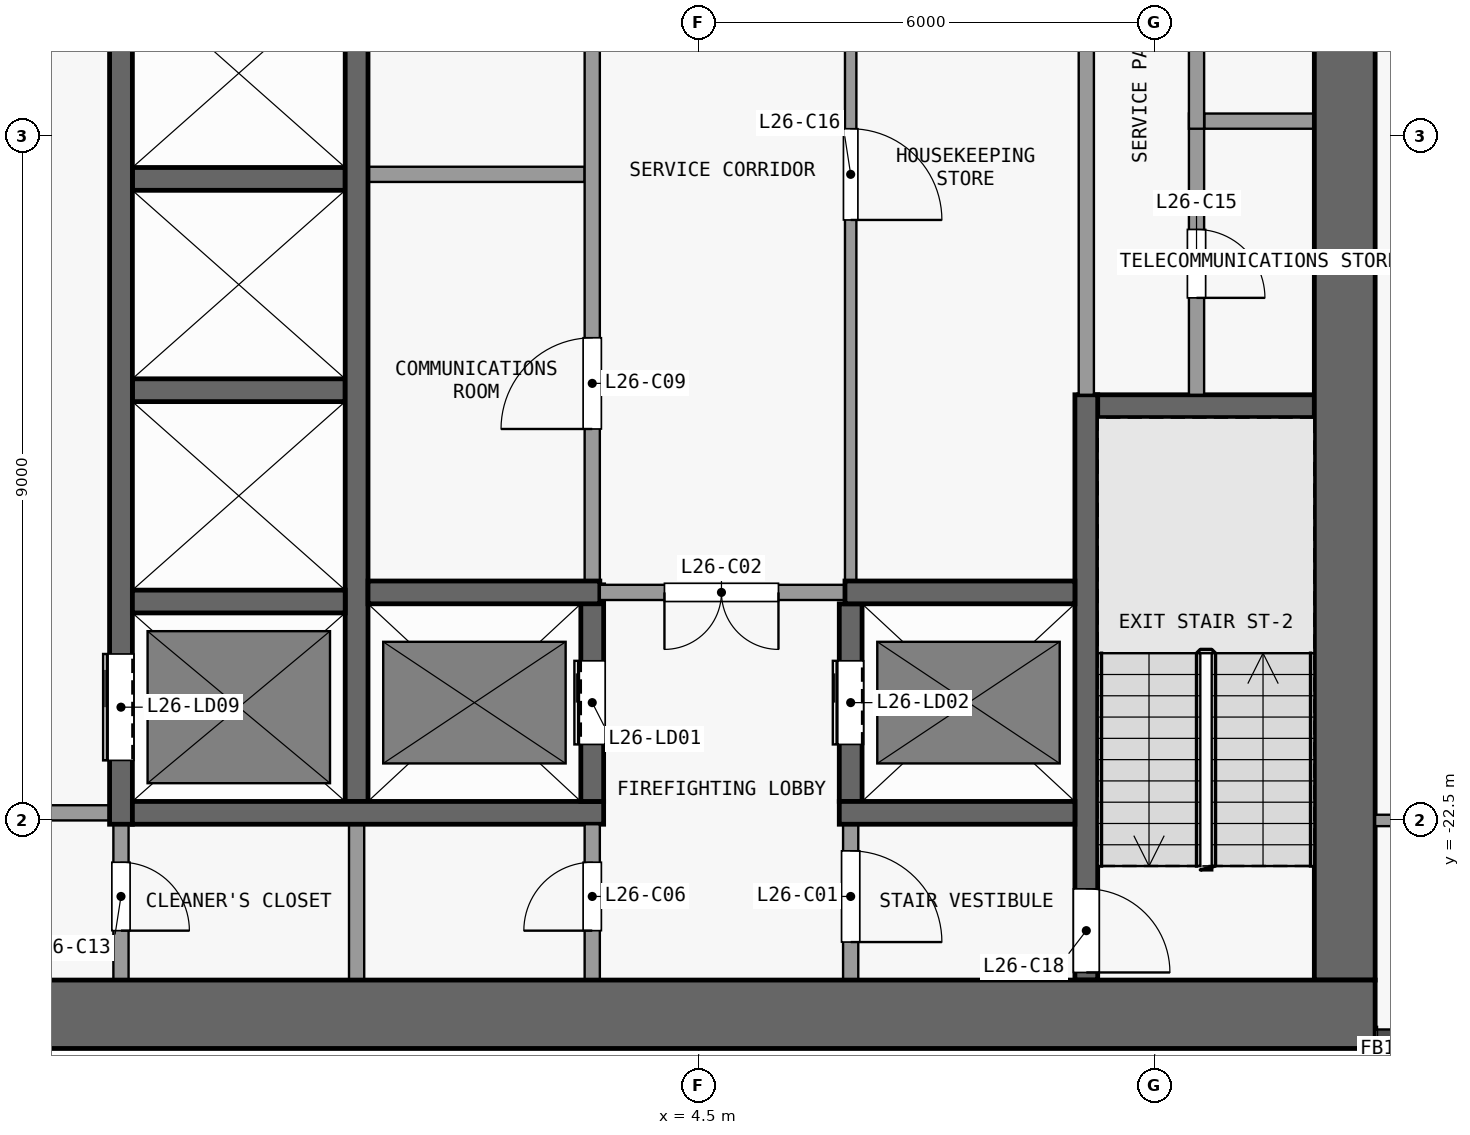
"""IFC4 building model, lengths in metres.
Left out: names, types, materials, properties, quantities, classifications, styles, units other than length and angle.
Written with IfcOpenShell. Run it as: python <this file> out.ifc"""

import sys

from ifc_helpers import new_model, si_unit, direction, frame, frame_2d, origin, place, context, subcontext, project, spatial, rectangle, extrude, element, fill, save


model = new_model("IFC4")
c1 = context("Model", 3, precision=1e-05, world=origin(), true_north=direction((0.0, 1.0)))
c2 = subcontext(c1, "Body", "Model", "MODEL_VIEW")
j1 = project(units=[si_unit("LENGTHUNIT", "METRE"), si_unit("PLANEANGLEUNIT", "RADIAN")], contexts=[c1])
p1 = place(None, origin())
s1 = spatial("IfcSite", under=j1, at=p1, CompositionType="ELEMENT")
p2 = place(p1, origin())
s2 = spatial("IfcBuilding", under=s1, at=p2, CompositionType="ELEMENT")
p3 = place(p2, frame((0.0, 0.0, 106.3)))
s3 = spatial("IfcBuildingStorey", under=s2, at=p3, CompositionType="ELEMENT", Elevation=106.3)
p4 = place(p3, frame((-13.4, -25.05, 0.0), z_axis=(0.0, 0.0, 1.0), x_axis=(1.0, 0.0, 0.0)))
e1 = element("IfcWall", 1, at=p4, inside=s3, PredefinedType="SHEAR", context=c2, shape_type="SweptSolid", body=[
    extrude(rectangle(XDim=26.8, YDim=0.9, at=frame_2d((13.4, 0.0))), origin(), (0.0, 0.0, 1.0), 3.3),
])
p5 = place(p3, frame((13.0, -24.6, 0.0), z_axis=(0.0, 0.0, 1.0), x_axis=(0.0, 1.0, 0.0)))
e2 = element("IfcWall", 2, at=p5, inside=s3, PredefinedType="SHEAR", context=c2, shape_type="SweptSolid", body=[
    extrude(rectangle(XDim=16.1, YDim=0.8, at=frame_2d((8.05, 0.0))), origin(), (0.0, 0.0, 1.0), 3.3),
])
p6 = place(p3, frame((-3.25, -22.4, 0.0), z_axis=(0.0, 0.0, 1.0), x_axis=(-1.0, 0.0, 0.0)))
e3 = element("IfcWall", 3, at=p6, inside=s3, PredefinedType="PARTITIONING", context=c2, shape_type="SweptSolid", body=[
    extrude(rectangle(XDim=3.1, YDim=0.2, at=frame_2d((1.55, 0.0))), origin(), (0.0, 0.0, 1.0), 3.3),
])
p7 = place(p6, frame((0.8, 0.0, 0.0)))
e4 = element("IfcOpeningElement", 4, at=p7, cuts=e3, PredefinedType="OPENING", context=c2, shape_type="SweptSolid", body=[
    extrude(rectangle(XDim=1.5, YDim=2.1, at=frame_2d((0.75, 1.05))), frame((0.0, 0.11, 0.0), z_axis=(0.0, -1.0, 0.0), x_axis=(1.0, 0.0, 0.0)), (0.0, 0.0, 1.0), 0.22),
])
p8 = place(p3, frame((-2.95, -22.4, 0.0), z_axis=(0.0, 0.0, 1.0), x_axis=(1.0, 0.0, 0.0)))
e5 = element("IfcWall", 5, at=p8, inside=s3, PredefinedType="SHEAR", context=c2, shape_type="SweptSolid", body=[
    extrude(rectangle(XDim=6.2, YDim=0.3, at=frame_2d((3.1, 0.0))), origin(), (0.0, 0.0, 1.0), 3.3),
])
p9 = place(p3, frame((6.35, -22.4, 0.0), z_axis=(0.0, 0.0, 1.0), x_axis=(1.0, 0.0, 0.0)))
e6 = element("IfcWall", 6, at=p9, inside=s3, PredefinedType="SHEAR", context=c2, shape_type="SweptSolid", body=[
    extrude(rectangle(XDim=3.1, YDim=0.3, at=frame_2d((1.55, 0.0))), origin(), (0.0, 0.0, 1.0), 3.3),
])
p10 = place(p3, frame((-2.95, -19.62, 0.0), z_axis=(0.0, 0.0, 1.0), x_axis=(1.0, 0.0, 0.0)))
e7 = element("IfcWall", 7, at=p10, inside=s3, PredefinedType="SHEAR", context=c2, shape_type="SweptSolid", body=[
    extrude(rectangle(XDim=2.8, YDim=0.3, at=frame_2d((1.4, 0.0))), origin(), (0.0, 0.0, 1.0), 3.3),
])
p11 = place(p3, frame((0.15, -19.5, 0.0), z_axis=(0.0, 0.0, 1.0), x_axis=(1.0, 0.0, 0.0)))
e8 = element("IfcWall", 8, at=p11, inside=s3, PredefinedType="SHEAR", context=c2, shape_type="SweptSolid", body=[
    extrude(rectangle(XDim=3.05, YDim=0.3, at=frame_2d((1.525, 0.0))), origin(), (0.0, 0.0, 1.0), 3.3),
])
p12 = place(p3, frame((6.575, -19.5, 0.0), z_axis=(0.0, 0.0, 1.0), x_axis=(-1.0, 0.0, 0.0)))
e9 = element("IfcWall", 9, at=p12, inside=s3, PredefinedType="PARTITIONING", context=c2, shape_type="SweptSolid", body=[
    extrude(rectangle(XDim=3.375, YDim=0.2, at=frame_2d((1.688, 0.0))), origin(), (0.0, 0.0, 1.0), 3.3),
])
p13 = place(p12, frame((1.025, 0.0, 0.0)))
e10 = element("IfcOpeningElement", 10, at=p13, cuts=e9, PredefinedType="OPENING", context=c2, shape_type="SweptSolid", body=[
    extrude(rectangle(XDim=1.5, YDim=2.1, at=frame_2d((0.75, 1.05))), frame((0.0, 0.11, 0.0), z_axis=(0.0, -1.0, 0.0), x_axis=(1.0, 0.0, 0.0)), (0.0, 0.0, 1.0), 0.22),
])
p14 = place(p3, frame((6.425, -19.5, 0.0), z_axis=(0.0, 0.0, 1.0), x_axis=(1.0, 0.0, 0.0)))
e11 = element("IfcWall", 11, at=p14, inside=s3, PredefinedType="SHEAR", context=c2, shape_type="SweptSolid", body=[
    extrude(rectangle(XDim=3.025, YDim=0.3, at=frame_2d((1.512, 0.0))), origin(), (0.0, 0.0, 1.0), 3.3),
])
p15 = place(p3, frame((9.5, -17.05, 0.0), z_axis=(0.0, 0.0, 1.0), x_axis=(1.0, 0.0, 0.0)))
e12 = element("IfcWall", 12, at=p15, inside=s3, PredefinedType="SHEAR", context=c2, shape_type="SweptSolid", body=[
    extrude(rectangle(XDim=3.1, YDim=0.3, at=frame_2d((1.55, 0.0))), origin(), (0.0, 0.0, 1.0), 3.3),
])
for number, where, z_axis, x_axis in (
    (13, (-2.95, -16.84, 0.0), (0.0, 0.0, 1.0), (1.0, 0.0, 0.0)),
    (14, (-2.95, -14.06, 0.0), (0.0, 0.0, 1.0), (1.0, 0.0, 0.0)),
):
    element("IfcWall", number, at=place(p3, frame(where, z_axis=z_axis, x_axis=x_axis)), inside=s3, PredefinedType="SHEAR", context=c2, shape_type="SweptSolid", body=[
        extrude(rectangle(XDim=2.8, YDim=0.3, at=frame_2d((1.4, 0.0))), origin(), (0.0, 0.0, 1.0), 3.3),
    ])
p16 = place(p3, frame((0.15, -14.0, 0.0), z_axis=(0.0, 0.0, 1.0), x_axis=(1.0, 0.0, 0.0)))
e15 = element("IfcWall", 15, at=p16, inside=s3, PredefinedType="PARTITIONING", context=c2, shape_type="SweptSolid", body=[
    extrude(rectangle(XDim=2.85, YDim=0.2, at=frame_2d((1.425, 0.0))), origin(), (0.0, 0.0, 1.0), 3.3),
])
p17 = place(p3, frame((11.15, -13.3, 0.0), z_axis=(0.0, 0.0, 1.0), x_axis=(1.0, 0.0, 0.0)))
e16 = element("IfcWall", 16, at=p17, inside=s3, PredefinedType="PARTITIONING", context=c2, shape_type="SweptSolid", body=[
    extrude(rectangle(XDim=1.45, YDim=0.2, at=frame_2d((0.725, 0.0))), origin(), (0.0, 0.0, 1.0), 3.3),
])
p18 = place(p3, frame((-3.1, -22.55, 0.0), z_axis=(0.0, 0.0, 1.0), x_axis=(0.0, -1.0, 0.0)))
e17 = element("IfcWall", 17, at=p18, inside=s3, PredefinedType="PARTITIONING", context=c2, shape_type="SweptSolid", body=[
    extrude(rectangle(XDim=2.05, YDim=0.2, at=frame_2d((1.025, 0.0))), origin(), (0.0, 0.0, 1.0), 3.3),
])
p19 = place(p18, frame((0.5, 0.0, 0.0)))
e18 = element("IfcOpeningElement", 18, at=p19, cuts=e17, PredefinedType="OPENING", context=c2, shape_type="SweptSolid", body=[
    extrude(rectangle(XDim=0.9, YDim=2.1, at=frame_2d((0.45, 1.05))), frame((0.0, 0.11, 0.0), z_axis=(0.0, -1.0, 0.0), x_axis=(1.0, 0.0, 0.0)), (0.0, 0.0, 1.0), 0.22),
])
p20 = place(p3, frame((-3.1, -22.55, 0.0), z_axis=(0.0, 0.0, 1.0), x_axis=(0.0, 1.0, 0.0)))
e19 = element("IfcWall", 19, at=p20, inside=s3, PredefinedType="SHEAR", context=c2, shape_type="SweptSolid", body=[
    extrude(rectangle(XDim=14.05, YDim=0.3, at=frame_2d((7.025, 0.0))), origin(), (0.0, 0.0, 1.0), 3.3),
])
p21 = place(p20, frame((12.11, 0.0, 0.0)))
e20 = element("IfcOpeningElement", 20, at=p21, cuts=e19, PredefinedType="OPENING", context=c2, shape_type="SweptSolid", body=[
    extrude(rectangle(XDim=1.1, YDim=2.1, at=frame_2d((0.55, 1.05))), frame((0.0, 0.16, 0.0), z_axis=(0.0, -1.0, 0.0), x_axis=(1.0, 0.0, 0.0)), (0.0, 0.0, 1.0), 0.32),
])
p22 = place(p20, frame((0.84, 0.0, 0.0)))
e21 = element("IfcOpeningElement", 21, at=p22, cuts=e19, PredefinedType="OPENING", context=c2, shape_type="SweptSolid", body=[
    extrude(rectangle(XDim=1.4, YDim=2.1, at=frame_2d((0.7, 1.05))), frame((0.0, 0.16, 0.0), z_axis=(0.0, -1.0, 0.0), x_axis=(1.0, 0.0, 0.0)), (0.0, 0.0, 1.0), 0.32),
])
p23 = place(p3, frame((0.0, -24.6, 0.0), z_axis=(0.0, 0.0, 1.0), x_axis=(0.0, 1.0, 0.0)))
e22 = element("IfcWall", 22, at=p23, inside=s3, PredefinedType="PARTITIONING", context=c2, shape_type="SweptSolid", body=[
    extrude(rectangle(XDim=2.05, YDim=0.2, at=frame_2d((1.025, 0.0))), origin(), (0.0, 0.0, 1.0), 3.3),
])
p24 = place(p3, frame((0.0, -22.25, 0.0), z_axis=(0.0, 0.0, 1.0), x_axis=(0.0, 1.0, 0.0)))
e23 = element("IfcWall", 23, at=p24, inside=s3, PredefinedType="SHEAR", context=c2, shape_type="SweptSolid", body=[
    extrude(rectangle(XDim=13.75, YDim=0.3, at=frame_2d((6.875, 0.0))), origin(), (0.0, 0.0, 1.0), 3.3),
])
p25 = place(p3, frame((3.1, -24.6, 0.0), z_axis=(0.0, 0.0, 1.0), x_axis=(0.0, 1.0, 0.0)))
e24 = element("IfcWall", 24, at=p25, inside=s3, PredefinedType="PARTITIONING", context=c2, shape_type="SweptSolid", body=[
    extrude(rectangle(XDim=2.05, YDim=0.2, at=frame_2d((1.025, 0.0))), origin(), (0.0, 0.0, 1.0), 3.3),
])
p26 = place(p25, frame((0.65, 0.0, 0.0)))
e25 = element("IfcOpeningElement", 25, at=p26, cuts=e24, PredefinedType="OPENING", context=c2, shape_type="SweptSolid", body=[
    extrude(rectangle(XDim=0.9, YDim=2.1, at=frame_2d((0.45, 1.05))), frame((0.0, 0.11, 0.0), z_axis=(0.0, -1.0, 0.0), x_axis=(1.0, 0.0, 0.0)), (0.0, 0.0, 1.0), 0.22),
])
p27 = place(p3, frame((3.1, -22.25, 0.0), z_axis=(0.0, 0.0, 1.0), x_axis=(0.0, 1.0, 0.0)))
e26 = element("IfcWall", 26, at=p27, inside=s3, PredefinedType="SHEAR", context=c2, shape_type="SweptSolid", body=[
    extrude(rectangle(XDim=2.85, YDim=0.3, at=frame_2d((1.425, 0.0))), origin(), (0.0, 0.0, 1.0), 3.3),
])
p28 = place(p27, frame((0.75, 0.0, 0.0)))
e27 = element("IfcOpeningElement", 27, at=p28, cuts=e26, PredefinedType="OPENING", context=c2, shape_type="SweptSolid", body=[
    extrude(rectangle(XDim=1.1, YDim=2.1, at=frame_2d((0.55, 1.05))), frame((0.0, 0.16, 0.0), z_axis=(0.0, -1.0, 0.0), x_axis=(1.0, 0.0, 0.0)), (0.0, 0.0, 1.0), 0.32),
])
p29 = place(p3, frame((3.1, -19.6, 0.0), z_axis=(0.0, 0.0, 1.0), x_axis=(0.0, 1.0, 0.0)))
e28 = element("IfcWall", 28, at=p29, inside=s3, PredefinedType="PARTITIONING", context=c2, shape_type="SweptSolid", body=[
    extrude(rectangle(XDim=11.1, YDim=0.2, at=frame_2d((5.55, 0.0))), origin(), (0.0, 0.0, 1.0), 3.3),
])
p30 = place(p29, frame((2.25, 0.0, 0.0)))
e29 = element("IfcOpeningElement", 29, at=p30, cuts=e28, PredefinedType="OPENING", context=c2, shape_type="SweptSolid", body=[
    extrude(rectangle(XDim=1.2, YDim=2.1, at=frame_2d((0.6, 1.05))), frame((0.0, 0.11, 0.0), z_axis=(0.0, -1.0, 0.0), x_axis=(1.0, 0.0, 0.0)), (0.0, 0.0, 1.0), 0.22),
])
p31 = place(p29, frame((7.75, 0.0, 0.0)))
e30 = element("IfcOpeningElement", 30, at=p31, cuts=e28, PredefinedType="OPENING", context=c2, shape_type="SweptSolid", body=[
    extrude(rectangle(XDim=1.2, YDim=2.1, at=frame_2d((0.6, 1.05))), frame((0.0, 0.11, 0.0), z_axis=(0.0, -1.0, 0.0), x_axis=(1.0, 0.0, 0.0)), (0.0, 0.0, 1.0), 0.22),
])
p32 = place(p3, frame((6.5, -22.55, 0.0), z_axis=(0.0, 0.0, 1.0), x_axis=(0.0, -1.0, 0.0)))
e31 = element("IfcWall", 31, at=p32, inside=s3, PredefinedType="PARTITIONING", context=c2, shape_type="SweptSolid", body=[
    extrude(rectangle(XDim=2.05, YDim=0.2, at=frame_2d((1.025, 0.0))), origin(), (0.0, 0.0, 1.0), 3.3),
])
p33 = place(p32, frame((0.35, 0.0, 0.0)))
e32 = element("IfcOpeningElement", 32, at=p33, cuts=e31, PredefinedType="OPENING", context=c2, shape_type="SweptSolid", body=[
    extrude(rectangle(XDim=1.2, YDim=2.1, at=frame_2d((0.6, 1.05))), frame((0.0, 0.11, 0.0), z_axis=(0.0, -1.0, 0.0), x_axis=(1.0, 0.0, 0.0)), (0.0, 0.0, 1.0), 0.22),
])
p34 = place(p3, frame((6.5, -22.25, 0.0), z_axis=(0.0, 0.0, 1.0), x_axis=(0.0, 1.0, 0.0)))
e33 = element("IfcWall", 33, at=p34, inside=s3, PredefinedType="SHEAR", context=c2, shape_type="SweptSolid", body=[
    extrude(rectangle(XDim=2.6, YDim=0.3, at=frame_2d((1.3, 0.0))), origin(), (0.0, 0.0, 1.0), 3.3),
])
p35 = place(p34, frame((0.75, 0.0, 0.0)))
e34 = element("IfcOpeningElement", 34, at=p35, cuts=e33, PredefinedType="OPENING", context=c2, shape_type="SweptSolid", body=[
    extrude(rectangle(XDim=1.1, YDim=2.1, at=frame_2d((0.55, 1.05))), frame((0.0, 0.16, 0.0), z_axis=(0.0, -1.0, 0.0), x_axis=(1.0, 0.0, 0.0)), (0.0, 0.0, 1.0), 0.32),
])
p36 = place(p3, frame((6.5, -8.5, 0.0), z_axis=(0.0, 0.0, 1.0), x_axis=(0.0, -1.0, 0.0)))
e35 = element("IfcWall", 35, at=p36, inside=s3, PredefinedType="PARTITIONING", context=c2, shape_type="SweptSolid", body=[
    extrude(rectangle(XDim=10.85, YDim=0.15, at=frame_2d((5.425, 0.0))), origin(), (0.0, 0.0, 1.0), 3.3),
])
p37 = place(p36, frame((4.9, 0.0, 0.0)))
e36 = element("IfcOpeningElement", 36, at=p37, cuts=e35, PredefinedType="OPENING", context=c2, shape_type="SweptSolid", body=[
    extrude(rectangle(XDim=1.2, YDim=2.1, at=frame_2d((0.6, 1.05))), frame((0.0, 0.085, 0.0), z_axis=(0.0, -1.0, 0.0), x_axis=(1.0, 0.0, 0.0)), (0.0, 0.0, 1.0), 0.17),
])
p38 = place(p3, frame((9.6, -16.9, 0.0), z_axis=(0.0, 0.0, 1.0), x_axis=(0.0, -1.0, 0.0)))
e37 = element("IfcWall", 37, at=p38, inside=s3, PredefinedType="SHEAR", context=c2, shape_type="SweptSolid", body=[
    extrude(rectangle(XDim=7.7, YDim=0.3, at=frame_2d((3.85, 0.0))), origin(), (0.0, 0.0, 1.0), 3.3),
])
p39 = place(p38, frame((6.5, 0.0, 0.0)))
e38 = element("IfcOpeningElement", 38, at=p39, cuts=e37, PredefinedType="OPENING", context=c2, shape_type="SweptSolid", body=[
    extrude(rectangle(XDim=1.1, YDim=2.1, at=frame_2d((0.55, 1.05))), frame((0.0, 0.16, 0.0), z_axis=(0.0, -1.0, 0.0), x_axis=(1.0, 0.0, 0.0)), (0.0, 0.0, 1.0), 0.32),
])
p40 = place(p3, frame((9.6, -16.9, 0.0), z_axis=(0.0, 0.0, 1.0), x_axis=(0.0, 1.0, 0.0)))
e39 = element("IfcWall", 39, at=p40, inside=s3, PredefinedType="PARTITIONING", context=c2, shape_type="SweptSolid", body=[
    extrude(rectangle(XDim=8.4, YDim=0.2, at=frame_2d((4.2, 0.0))), origin(), (0.0, 0.0, 1.0), 3.3),
])
p41 = place(p3, frame((11.05, -13.2, 0.0), z_axis=(0.0, 0.0, 1.0), x_axis=(0.0, -1.0, 0.0)))
e40 = element("IfcWall", 40, at=p41, inside=s3, PredefinedType="PARTITIONING", context=c2, shape_type="SweptSolid", body=[
    extrude(rectangle(XDim=3.7, YDim=0.2, at=frame_2d((1.85, 0.0))), origin(), (0.0, 0.0, 1.0), 3.3),
])
p42 = place(p41, frame((1.525, 0.0, 0.0)))
e41 = element("IfcOpeningElement", 41, at=p42, cuts=e40, PredefinedType="OPENING", context=c2, shape_type="SweptSolid", body=[
    extrude(rectangle(XDim=0.9, YDim=2.1, at=frame_2d((0.45, 1.05))), frame((0.0, 0.11, 0.0), z_axis=(0.0, -1.0, 0.0), x_axis=(1.0, 0.0, 0.0)), (0.0, 0.0, 1.0), 0.22),
])
p43 = place(p3, frame((11.05, -8.5, 0.0), z_axis=(0.0, 0.0, 1.0), x_axis=(0.0, -1.0, 0.0)))
e42 = element("IfcWall", 42, at=p43, inside=s3, PredefinedType="PARTITIONING", context=c2, shape_type="SweptSolid", body=[
    extrude(rectangle(XDim=4.9, YDim=0.2, at=frame_2d((2.45, 0.0))), origin(), (0.0, 0.0, 1.0), 3.3),
])
p44 = place(p43, frame((1.95, 0.0, 0.0)))
e43 = element("IfcOpeningElement", 43, at=p44, cuts=e42, PredefinedType="OPENING", context=c2, shape_type="SweptSolid", body=[
    extrude(rectangle(XDim=0.9, YDim=2.1, at=frame_2d((0.45, 1.05))), frame((0.0, 0.11, 0.0), z_axis=(0.0, -1.0, 0.0), x_axis=(1.0, 0.0, 0.0)), (0.0, 0.0, 1.0), 0.22),
])
p45 = place(p3, frame((13.4, -22.5, 0.0), z_axis=(0.0, 0.0, 1.0), x_axis=(1.0, 0.0, 0.0)))
e44 = element("IfcWall", 44, at=p45, inside=s3, PredefinedType="PARTITIONING", context=c2, shape_type="SweptSolid", body=[
    extrude(rectangle(XDim=2.925, YDim=0.15, at=frame_2d((1.462, 0.0))), origin(), (0.0, 0.0, 1.0), 3.3),
])
p46 = place(p45, frame((1.0, 0.0, 0.0)))
e45 = element("IfcOpeningElement", 45, at=p46, cuts=e44, PredefinedType="OPENING", context=c2, shape_type="SweptSolid", body=[
    extrude(rectangle(XDim=0.9, YDim=2.1, at=frame_2d((0.45, 1.05))), frame((0.0, 0.085, 0.0), z_axis=(0.0, -1.0, 0.0), x_axis=(1.0, 0.0, 0.0)), (0.0, 0.0, 1.0), 0.17),
])
p47 = place(p28, origin())
e46 = element("IfcDoor", 46, at=p47, inside=s3, OperationType="DOUBLE_DOOR_SLIDING", PredefinedType="DOOR", context=c2, shape_type="SweptSolid", body=[
    extrude(rectangle(XDim=1.1, YDim=2.1, at=frame_2d((0.55, 1.05))), frame((0.0, 0.025, 0.0), z_axis=(0.0, -1.0, 0.0), x_axis=(1.0, 0.0, 0.0)), (0.0, 0.0, 1.0), 0.05),
])
fill(e27, e46)
p48 = place(p35, origin())
e47 = element("IfcDoor", 47, at=p48, inside=s3, OperationType="DOUBLE_DOOR_SLIDING", PredefinedType="DOOR", context=c2, shape_type="SweptSolid", body=[
    extrude(rectangle(XDim=1.1, YDim=2.1, at=frame_2d((0.55, 1.05))), frame((0.0, 0.025, 0.0), z_axis=(0.0, -1.0, 0.0), x_axis=(1.0, 0.0, 0.0)), (0.0, 0.0, 1.0), 0.05),
])
fill(e34, e47)
p49 = place(p22, origin())
e48 = element("IfcDoor", 48, at=p49, inside=s3, OperationType="DOUBLE_DOOR_SLIDING", PredefinedType="DOOR", context=c2, shape_type="SweptSolid", body=[
    extrude(rectangle(XDim=1.4, YDim=2.1, at=frame_2d((0.7, 1.05))), frame((0.0, 0.025, 0.0), z_axis=(0.0, -1.0, 0.0), x_axis=(1.0, 0.0, 0.0)), (0.0, 0.0, 1.0), 0.05),
])
fill(e21, e48)
p50 = place(p33, origin())
e49 = element("IfcDoor", 49, at=p50, inside=s3, OperationType="SINGLE_SWING_RIGHT", PredefinedType="DOOR", context=c2, shape_type="SweptSolid", body=[
    extrude(rectangle(XDim=1.2, YDim=2.1, at=frame_2d((0.6, 1.05))), frame((0.0, 0.025, 0.0), z_axis=(0.0, -1.0, 0.0), x_axis=(1.0, 0.0, 0.0)), (0.0, 0.0, 1.0), 0.05),
])
fill(e32, e49)
p51 = place(p13, origin())
e50 = element("IfcDoor", 50, at=p51, inside=s3, OperationType="DOUBLE_DOOR_SINGLE_SWING", PredefinedType="DOOR", context=c2, shape_type="SweptSolid", body=[
    extrude(rectangle(XDim=1.5, YDim=2.1, at=frame_2d((0.75, 1.05))), frame((0.0, 0.025, 0.0), z_axis=(0.0, -1.0, 0.0), x_axis=(1.0, 0.0, 0.0)), (0.0, 0.0, 1.0), 0.05),
])
fill(e10, e50)
p52 = place(p26, origin())
e51 = element("IfcDoor", 51, at=p52, inside=s3, OperationType="SINGLE_SWING_LEFT", PredefinedType="DOOR", context=c2, shape_type="SweptSolid", body=[
    extrude(rectangle(XDim=0.9, YDim=2.1, at=frame_2d((0.45, 1.05))), frame((0.0, 0.025, 0.0), z_axis=(0.0, -1.0, 0.0), x_axis=(1.0, 0.0, 0.0)), (0.0, 0.0, 1.0), 0.05),
])
fill(e25, e51)
p53 = place(p30, origin())
e52 = element("IfcDoor", 52, at=p53, inside=s3, OperationType="SINGLE_SWING_LEFT", PredefinedType="DOOR", context=c2, shape_type="SweptSolid", body=[
    extrude(rectangle(XDim=1.2, YDim=2.1, at=frame_2d((0.6, 1.05))), frame((0.0, 0.025, 0.0), z_axis=(0.0, -1.0, 0.0), x_axis=(1.0, 0.0, 0.0)), (0.0, 0.0, 1.0), 0.05),
])
fill(e29, e52)
p54 = place(p19, origin())
e53 = element("IfcDoor", 53, at=p54, inside=s3, OperationType="SINGLE_SWING_RIGHT", PredefinedType="DOOR", context=c2, shape_type="SweptSolid", body=[
    extrude(rectangle(XDim=0.9, YDim=2.1, at=frame_2d((0.45, 1.05))), frame((0.0, 0.025, 0.0), z_axis=(0.0, -1.0, 0.0), x_axis=(1.0, 0.0, 0.0)), (0.0, 0.0, 1.0), 0.05),
])
fill(e18, e53)
p55 = place(p42, origin())
e54 = element("IfcDoor", 54, at=p55, inside=s3, OperationType="SINGLE_SWING_RIGHT", PredefinedType="DOOR", context=c2, shape_type="SweptSolid", body=[
    extrude(rectangle(XDim=0.9, YDim=2.1, at=frame_2d((0.45, 1.05))), frame((0.0, 0.025, 0.0), z_axis=(0.0, -1.0, 0.0), x_axis=(1.0, 0.0, 0.0)), (0.0, 0.0, 1.0), 0.05),
])
fill(e41, e54)
p56 = place(p37, origin())
e55 = element("IfcDoor", 55, at=p56, inside=s3, OperationType="SINGLE_SWING_RIGHT", PredefinedType="DOOR", context=c2, shape_type="SweptSolid", body=[
    extrude(rectangle(XDim=1.2, YDim=2.1, at=frame_2d((0.6, 1.05))), frame((0.0, 0.025, 0.0), z_axis=(0.0, -1.0, 0.0), x_axis=(1.0, 0.0, 0.0)), (0.0, 0.0, 1.0), 0.05),
])
fill(e36, e55)
p57 = place(p39, origin())
e56 = element("IfcDoor", 56, at=p57, inside=s3, OperationType="SINGLE_SWING_RIGHT", PredefinedType="DOOR", context=c2, shape_type="SweptSolid", body=[
    extrude(rectangle(XDim=1.1, YDim=2.1, at=frame_2d((0.55, 1.05))), frame((0.0, 0.025, 0.0), z_axis=(0.0, -1.0, 0.0), x_axis=(1.0, 0.0, 0.0)), (0.0, 0.0, 1.0), 0.05),
])
fill(e38, e56)
save(model, sys.argv[1])
